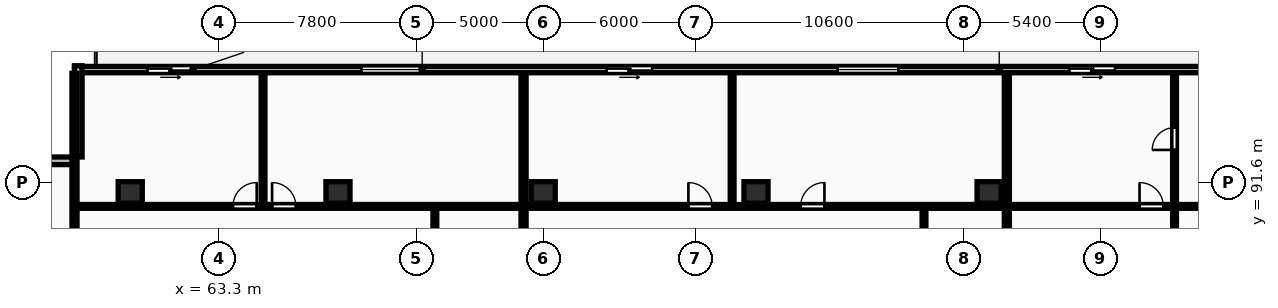
"""IFC4 building model, lengths in metres.
Left out: names, types, materials, properties, quantities, classifications, styles, units other than length and angle.
Written with IfcOpenShell. Run it as: python <this file> out.ifc"""

import sys

from ifc_helpers import new_model, si_unit, direction, frame, frame_2d, origin, origin_2d, place, context, subcontext, project, spatial, rectangle, extrude, element, fill, save


model = new_model("IFC4")
c1 = context("Model", 3, precision=1e-05, world=origin(), true_north=direction((0.0, 1.0)))
c2 = subcontext(c1, "Body", "Model", "MODEL_VIEW")
j1 = project(units=[si_unit("LENGTHUNIT", "METRE"), si_unit("PLANEANGLEUNIT", "RADIAN")], contexts=[c1])
p1 = place(None, origin())
s1 = spatial("IfcSite", under=j1, at=p1, CompositionType="ELEMENT")
p2 = place(p1, origin())
s2 = spatial("IfcBuilding", under=s1, at=p2, CompositionType="ELEMENT")
p3 = place(p2, frame((0.0, 0.0, 106.8)))
s3 = spatial("IfcBuildingStorey", under=s2, at=p3, CompositionType="ELEMENT", Elevation=106.8)
for number, where, z_axis, x_axis in (
    (1, (59.8, 91.2, 0.0), (0.0, 0.0, 1.0), (1.0, 0.0, 0.0)),
    (2, (68.0, 91.2, 0.0), (0.0, 0.0, 1.0), (1.0, 0.0, 0.0)),
    (3, (76.1, 91.2, 0.0), (0.0, 0.0, 1.0), (1.0, 0.0, 0.0)),
    (4, (84.5, 91.2, 0.0), (0.0, 0.0, 1.0), (1.0, 0.0, 0.0)),
    (5, (93.7, 91.2, 0.0), (0.0, 0.0, 1.0), (1.0, 0.0, 0.0)),
):
    element("IfcColumn", number, at=place(p3, frame(where, z_axis=z_axis, x_axis=x_axis)), inside=s3, PredefinedType="COLUMN", context=c2, shape_type="SweptSolid", body=[
        extrude(rectangle(XDim=0.95, YDim=0.85, at=origin_2d()), origin(), (0.0, 0.0, 1.0), 3.25),
    ])
p4 = place(p3, frame((130.6, 96.05, 0.0), z_axis=(0.0, 0.0, 1.0), x_axis=(-1.0, 0.0, 0.0)))
e6 = element("IfcWall", 6, at=p4, inside=s3, PredefinedType="STANDARD", context=c2, shape_type="SweptSolid", body=[
    extrude(rectangle(XDim=73.0, YDim=0.25, at=frame_2d((36.5, 0.0))), origin(), (0.0, 0.0, 1.0), 2.97),
])
p5 = place(p4, frame((68.319, 0.0, 0.0)))
e7 = element("IfcOpeningElement", 7, at=p5, cuts=e6, PredefinedType="OPENING", context=c2, shape_type="SweptSolid", body=[
    extrude(rectangle(XDim=1.8, YDim=2.2, at=frame_2d((0.9, 1.1))), frame((0.0, 0.135, 0.0), z_axis=(0.0, -1.0, 0.0), x_axis=(1.0, 0.0, 0.0)), (0.0, 0.0, 1.0), 0.27),
])
p6 = place(p4, frame((59.277, 0.0, 0.85)))
e8 = element("IfcOpeningElement", 8, at=p6, cuts=e6, PredefinedType="OPENING", context=c2, shape_type="SweptSolid", body=[
    extrude(rectangle(XDim=2.4, YDim=1.9, at=frame_2d((1.2, 0.95))), frame((0.0, 0.135, 0.0), z_axis=(0.0, -1.0, 0.0), x_axis=(1.0, 0.0, 0.0)), (0.0, 0.0, 1.0), 0.27),
])
p7 = place(p4, frame((50.199, 0.0, 0.0)))
e9 = element("IfcOpeningElement", 9, at=p7, cuts=e6, PredefinedType="OPENING", context=c2, shape_type="SweptSolid", body=[
    extrude(rectangle(XDim=1.8, YDim=2.2, at=frame_2d((0.9, 1.1))), frame((0.0, 0.135, 0.0), z_axis=(0.0, -1.0, 0.0), x_axis=(1.0, 0.0, 0.0)), (0.0, 0.0, 1.0), 0.27),
])
p8 = place(p4, frame((40.481, 0.0, 0.85)))
e10 = element("IfcOpeningElement", 10, at=p8, cuts=e6, PredefinedType="OPENING", context=c2, shape_type="SweptSolid", body=[
    extrude(rectangle(XDim=2.4, YDim=1.9, at=frame_2d((1.2, 0.95))), frame((0.0, 0.135, 0.0), z_axis=(0.0, -1.0, 0.0), x_axis=(1.0, 0.0, 0.0)), (0.0, 0.0, 1.0), 0.27),
])
p9 = place(p4, frame((31.93, 0.0, 0.0)))
e11 = element("IfcOpeningElement", 11, at=p9, cuts=e6, PredefinedType="OPENING", context=c2, shape_type="SweptSolid", body=[
    extrude(rectangle(XDim=1.8, YDim=2.2, at=frame_2d((0.9, 1.1))), frame((0.0, 0.135, 0.0), z_axis=(0.0, -1.0, 0.0), x_axis=(1.0, 0.0, 0.0)), (0.0, 0.0, 1.0), 0.27),
])
p10 = place(p4, frame((26.042, 0.0, 0.85)))
e12 = element("IfcOpeningElement", 12, at=p10, cuts=e6, PredefinedType="OPENING", context=c2, shape_type="SweptSolid", body=[
    extrude(rectangle(XDim=2.4, YDim=1.9, at=frame_2d((1.2, 0.95))), frame((0.0, 0.135, 0.0), z_axis=(0.0, -1.0, 0.0), x_axis=(1.0, 0.0, 0.0)), (0.0, 0.0, 1.0), 0.27),
])
p11 = place(p4, frame((19.15, 0.0, 0.0)))
e13 = element("IfcOpeningElement", 13, at=p11, cuts=e6, PredefinedType="OPENING", context=c2, shape_type="SweptSolid", body=[
    extrude(rectangle(XDim=1.8, YDim=2.2, at=frame_2d((0.9, 1.1))), frame((0.0, 0.135, 0.0), z_axis=(0.0, -1.0, 0.0), x_axis=(1.0, 0.0, 0.0)), (0.0, 0.0, 1.0), 0.27),
])
p12 = place(p4, frame((12.886, 0.0, 0.85)))
e14 = element("IfcOpeningElement", 14, at=p12, cuts=e6, PredefinedType="OPENING", context=c2, shape_type="SweptSolid", body=[
    extrude(rectangle(XDim=1.8, YDim=1.8, at=frame_2d((0.9, 0.9))), frame((0.0, 0.135, 0.0), z_axis=(0.0, -1.0, 0.0), x_axis=(1.0, 0.0, 0.0)), (0.0, 0.0, 1.0), 0.27),
])
p13 = place(p4, frame((7.088, 0.0, 0.0)))
e15 = element("IfcOpeningElement", 15, at=p13, cuts=e6, PredefinedType="OPENING", context=c2, shape_type="SweptSolid", body=[
    extrude(rectangle(XDim=1.8, YDim=2.2, at=frame_2d((0.9, 1.1))), frame((0.0, 0.135, 0.0), z_axis=(0.0, -1.0, 0.0), x_axis=(1.0, 0.0, 0.0)), (0.0, 0.0, 1.0), 0.27),
])
p14 = place(p4, frame((0.9, 0.0, 0.85)))
e16 = element("IfcOpeningElement", 16, at=p14, cuts=e6, PredefinedType="OPENING", context=c2, shape_type="SweptSolid", body=[
    extrude(rectangle(XDim=2.4, YDim=1.9, at=frame_2d((1.2, 0.95))), frame((0.0, 0.135, 0.0), z_axis=(0.0, -1.0, 0.0), x_axis=(1.0, 0.0, 0.0)), (0.0, 0.0, 1.0), 0.27),
])
p15 = place(p3, frame((57.75, 96.2, 0.0), z_axis=(0.0, 0.0, 1.0), x_axis=(0.0, -1.0, 0.0)))
e17 = element("IfcWall", 17, at=p15, inside=s3, PredefinedType="STANDARD", context=c2, shape_type="SweptSolid", body=[
    extrude(rectangle(XDim=3.6, YDim=0.3, at=frame_2d((1.8, 0.0))), origin(), (0.0, 0.0, 1.0), 2.97),
])
p16 = place(p3, frame((57.6, 92.45, 0.0), z_axis=(0.0, 0.0, 1.0), x_axis=(-1.0, 0.0, 0.0)))
e18 = element("IfcWall", 18, at=p16, inside=s3, PredefinedType="STANDARD", context=c2, shape_type="SweptSolid", body=[
    extrude(rectangle(XDim=3.6, YDim=0.3, at=frame_2d((1.8, 0.0))), origin(), (0.0, 0.0, 1.0), 2.97),
])
for number, where, z_axis, x_axis in (
    (19, (57.6, 69.83, 0.0), (0.0, 0.0, 1.0), (0.0, 1.0, 0.0)),
    (20, (75.325, 69.83, 0.0), (0.0, 0.0, 1.0), (0.0, 1.0, 0.0)),
):
    element("IfcWall", number, at=place(p3, frame(where, z_axis=z_axis, x_axis=x_axis)), inside=s3, PredefinedType="PARTITIONING", context=c2, shape_type="SweptSolid", body=[
        extrude(rectangle(XDim=26.07, YDim=0.2, at=frame_2d((13.035, 0.0))), origin(), (0.0, 0.0, 1.0), 2.97),
    ])
p17 = place(p3, frame((71.825, 69.81, 0.0), z_axis=(0.0, 0.0, 1.0), x_axis=(0.0, 1.0, 0.0)))
e21 = element("IfcWall", 21, at=p17, inside=s3, PredefinedType="PARTITIONING", context=c2, shape_type="SweptSolid", body=[
    extrude(rectangle(XDim=20.78, YDim=0.15, at=frame_2d((10.39, 0.0))), origin(), (0.0, 0.0, 1.0), 2.97),
])
p18 = place(p17, frame((2.406, 0.0, 0.0)))
e22 = element("IfcOpeningElement", 22, at=p18, cuts=e21, PredefinedType="OPENING", context=c2, shape_type="SweptSolid", body=[
    extrude(rectangle(XDim=0.96, YDim=2.1, at=frame_2d((0.48, 1.05))), frame((0.0, 0.085, 0.0), z_axis=(0.0, -1.0, 0.0), x_axis=(1.0, 0.0, 0.0)), (0.0, 0.0, 1.0), 0.17),
])
p19 = place(p17, frame((6.133, 0.0, 0.0)))
e23 = element("IfcOpeningElement", 23, at=p19, cuts=e21, PredefinedType="OPENING", context=c2, shape_type="SweptSolid", body=[
    extrude(rectangle(XDim=0.88, YDim=2.06, at=frame_2d((0.44, 1.03))), frame((0.0, 0.085, 0.0), z_axis=(0.0, -1.0, 0.0), x_axis=(1.0, 0.0, 0.0)), (0.0, 0.0, 1.0), 0.17),
])
p20 = place(p17, frame((9.97, 0.0, 0.0)))
e24 = element("IfcOpeningElement", 24, at=p20, cuts=e21, PredefinedType="OPENING", context=c2, shape_type="SweptSolid", body=[
    extrude(rectangle(XDim=0.84, YDim=2.04, at=frame_2d((0.42, 1.02))), frame((0.0, 0.085, 0.0), z_axis=(0.0, -1.0, 0.0), x_axis=(1.0, 0.0, 0.0)), (0.0, 0.0, 1.0), 0.17),
])
p21 = place(p3, frame((65.042, 90.73, 0.0), z_axis=(0.0, 0.0, 1.0), x_axis=(0.0, 1.0, 0.0)))
e25 = element("IfcWall", 25, at=p21, inside=s3, PredefinedType="PARTITIONING", context=c2, shape_type="SweptSolid", body=[
    extrude(rectangle(XDim=5.17, YDim=0.15, at=frame_2d((2.585, 0.0))), origin(), (0.0, 0.0, 1.0), 2.97),
])
p22 = place(p3, frame((57.68, 90.65, 0.0), z_axis=(0.0, 0.0, 1.0), x_axis=(1.0, 0.0, 0.0)))
e26 = element("IfcWall", 26, at=p22, inside=s3, PredefinedType="PARTITIONING", context=c2, shape_type="SweptSolid", body=[
    extrude(rectangle(XDim=17.565, YDim=0.15, at=frame_2d((8.782, 0.0))), origin(), (0.0, 0.0, 1.0), 2.97),
])
p23 = place(p22, frame((6.172, 0.0, 0.0)))
e27 = element("IfcOpeningElement", 27, at=p23, cuts=e26, PredefinedType="OPENING", context=c2, shape_type="SweptSolid", body=[
    extrude(rectangle(XDim=0.94, YDim=2.1, at=frame_2d((0.47, 1.05))), frame((0.0, 0.085, 0.0), z_axis=(0.0, -1.0, 0.0), x_axis=(1.0, 0.0, 0.0)), (0.0, 0.0, 1.0), 0.17),
])
p24 = place(p22, frame((7.719, 0.0, 0.0)))
e28 = element("IfcOpeningElement", 28, at=p24, cuts=e26, PredefinedType="OPENING", context=c2, shape_type="SweptSolid", body=[
    extrude(rectangle(XDim=0.94, YDim=2.1, at=frame_2d((0.47, 1.05))), frame((0.0, 0.085, 0.0), z_axis=(0.0, -1.0, 0.0), x_axis=(1.0, 0.0, 0.0)), (0.0, 0.0, 1.0), 0.17),
])
p25 = place(p3, frame((94.401, 69.83, 0.0), z_axis=(0.0, 0.0, 1.0), x_axis=(0.0, 1.0, 0.0)))
e29 = element("IfcWall", 29, at=p25, inside=s3, PredefinedType="PARTITIONING", context=c2, shape_type="SweptSolid", body=[
    extrude(rectangle(XDim=26.07, YDim=0.2, at=frame_2d((13.035, 0.0))), origin(), (0.0, 0.0, 1.0), 2.97),
])
p26 = place(p3, frame((91.131, 69.81, 0.0), z_axis=(0.0, 0.0, 1.0), x_axis=(0.0, 1.0, 0.0)))
e30 = element("IfcWall", 30, at=p26, inside=s3, PredefinedType="PARTITIONING", context=c2, shape_type="SweptSolid", body=[
    extrude(rectangle(XDim=20.78, YDim=0.15, at=frame_2d((10.39, 0.0))), origin(), (0.0, 0.0, 1.0), 2.97),
])
p27 = place(p26, frame((2.406, 0.0, 0.0)))
e31 = element("IfcOpeningElement", 31, at=p27, cuts=e30, PredefinedType="OPENING", context=c2, shape_type="SweptSolid", body=[
    extrude(rectangle(XDim=0.96, YDim=2.1, at=frame_2d((0.48, 1.05))), frame((0.0, 0.085, 0.0), z_axis=(0.0, -1.0, 0.0), x_axis=(1.0, 0.0, 0.0)), (0.0, 0.0, 1.0), 0.17),
])
p28 = place(p26, frame((6.133, 0.0, 0.0)))
e32 = element("IfcOpeningElement", 32, at=p28, cuts=e30, PredefinedType="OPENING", context=c2, shape_type="SweptSolid", body=[
    extrude(rectangle(XDim=0.88, YDim=2.06, at=frame_2d((0.44, 1.03))), frame((0.0, 0.085, 0.0), z_axis=(0.0, -1.0, 0.0), x_axis=(1.0, 0.0, 0.0)), (0.0, 0.0, 1.0), 0.17),
])
p29 = place(p26, frame((11.615, 0.0, 0.0)))
e33 = element("IfcOpeningElement", 33, at=p29, cuts=e30, PredefinedType="OPENING", context=c2, shape_type="SweptSolid", body=[
    extrude(rectangle(XDim=0.84, YDim=2.04, at=frame_2d((0.42, 1.02))), frame((0.0, 0.085, 0.0), z_axis=(0.0, -1.0, 0.0), x_axis=(1.0, 0.0, 0.0)), (0.0, 0.0, 1.0), 0.17),
])
p30 = place(p3, frame((83.558, 90.73, 0.0), z_axis=(0.0, 0.0, 1.0), x_axis=(0.0, 1.0, 0.0)))
e34 = element("IfcWall", 34, at=p30, inside=s3, PredefinedType="PARTITIONING", context=c2, shape_type="SweptSolid", body=[
    extrude(rectangle(XDim=5.17, YDim=0.15, at=frame_2d((2.585, 0.0))), origin(), (0.0, 0.0, 1.0), 2.97),
])
p31 = place(p3, frame((75.405, 90.65, 0.0), z_axis=(0.0, 0.0, 1.0), x_axis=(1.0, 0.0, 0.0)))
e35 = element("IfcWall", 35, at=p31, inside=s3, PredefinedType="PARTITIONING", context=c2, shape_type="SweptSolid", body=[
    extrude(rectangle(XDim=18.916, YDim=0.15, at=frame_2d((9.458, 0.0))), origin(), (0.0, 0.0, 1.0), 2.97),
])
p32 = place(p31, frame((6.426, 0.0, 0.0)))
e36 = element("IfcOpeningElement", 36, at=p32, cuts=e35, PredefinedType="OPENING", context=c2, shape_type="SweptSolid", body=[
    extrude(rectangle(XDim=0.94, YDim=2.1, at=frame_2d((0.47, 1.05))), frame((0.0, 0.085, 0.0), z_axis=(0.0, -1.0, 0.0), x_axis=(1.0, 0.0, 0.0)), (0.0, 0.0, 1.0), 0.17),
])
p33 = place(p31, frame((10.856, 0.0, 0.0)))
e37 = element("IfcOpeningElement", 37, at=p33, cuts=e35, PredefinedType="OPENING", context=c2, shape_type="SweptSolid", body=[
    extrude(rectangle(XDim=0.94, YDim=2.1, at=frame_2d((0.47, 1.05))), frame((0.0, 0.085, 0.0), z_axis=(0.0, -1.0, 0.0), x_axis=(1.0, 0.0, 0.0)), (0.0, 0.0, 1.0), 0.17),
])
p34 = place(p3, frame((101.02, 85.59, 0.0), z_axis=(0.0, 0.0, 1.0), x_axis=(0.0, 1.0, 0.0)))
e38 = element("IfcWall", 38, at=p34, inside=s3, PredefinedType="PARTITIONING", context=c2, shape_type="SweptSolid", body=[
    extrude(rectangle(XDim=10.31, YDim=0.15, at=frame_2d((5.155, 0.0))), origin(), (0.0, 0.0, 1.0), 2.97),
])
p35 = place(p34, frame((1.43, 0.0, 0.0)))
e39 = element("IfcOpeningElement", 39, at=p35, cuts=e38, PredefinedType="OPENING", context=c2, shape_type="SweptSolid", body=[
    extrude(rectangle(XDim=0.84, YDim=2.04, at=frame_2d((0.42, 1.02))), frame((0.0, 0.085, 0.0), z_axis=(0.0, -1.0, 0.0), x_axis=(1.0, 0.0, 0.0)), (0.0, 0.0, 1.0), 0.17),
])
p36 = place(p34, frame((3.102, 0.0, 0.0)))
e40 = element("IfcOpeningElement", 40, at=p36, cuts=e38, PredefinedType="OPENING", context=c2, shape_type="SweptSolid", body=[
    extrude(rectangle(XDim=0.84, YDim=2.04, at=frame_2d((0.42, 1.02))), frame((0.0, 0.085, 0.0), z_axis=(0.0, -1.0, 0.0), x_axis=(1.0, 0.0, 0.0)), (0.0, 0.0, 1.0), 0.17),
])
p37 = place(p34, frame((7.29, 0.0, 0.0)))
e41 = element("IfcOpeningElement", 41, at=p37, cuts=e38, PredefinedType="OPENING", context=c2, shape_type="SweptSolid", body=[
    extrude(rectangle(XDim=0.88, YDim=2.06, at=frame_2d((0.44, 1.03))), frame((0.0, 0.085, 0.0), z_axis=(0.0, -1.0, 0.0), x_axis=(1.0, 0.0, 0.0)), (0.0, 0.0, 1.0), 0.17),
])
p38 = place(p3, frame((94.481, 90.65, 0.0), z_axis=(0.0, 0.0, 1.0), x_axis=(1.0, 0.0, 0.0)))
e42 = element("IfcWall", 42, at=p38, inside=s3, PredefinedType="PARTITIONING", context=c2, shape_type="SweptSolid", body=[
    extrude(rectangle(XDim=11.256, YDim=0.15, at=frame_2d((5.628, 0.0))), origin(), (0.0, 0.0, 1.0), 2.97),
])
p39 = place(p38, frame((5.158, 0.0, 0.0)))
e43 = element("IfcOpeningElement", 43, at=p39, cuts=e42, PredefinedType="OPENING", context=c2, shape_type="SweptSolid", body=[
    extrude(rectangle(XDim=0.94, YDim=2.1, at=frame_2d((0.47, 1.05))), frame((0.0, 0.085, 0.0), z_axis=(0.0, -1.0, 0.0), x_axis=(1.0, 0.0, 0.0)), (0.0, 0.0, 1.0), 0.17),
])
p40 = place(p5, origin())
e44 = element("IfcDoor", 44, at=p40, inside=s3, OperationType="SLIDING_TO_LEFT", PredefinedType="DOOR", context=c2, shape_type="SweptSolid", body=[
    extrude(rectangle(XDim=1.8, YDim=2.2, at=frame_2d((0.9, 1.1))), frame((0.0, 0.025, 0.0), z_axis=(0.0, -1.0, 0.0), x_axis=(1.0, 0.0, 0.0)), (0.0, 0.0, 1.0), 0.05),
])
fill(e7, e44)
p41 = place(p6, origin())
e45 = element("IfcWindow", 45, at=p41, inside=s3, PartitioningType="DOUBLE_PANEL_VERTICAL", PredefinedType="WINDOW", context=c2, shape_type="SweptSolid", body=[
    extrude(rectangle(XDim=2.4, YDim=1.9, at=frame_2d((1.2, 0.95))), frame((0.0, 0.03, 0.0), z_axis=(0.0, -1.0, 0.0), x_axis=(1.0, 0.0, 0.0)), (0.0, 0.0, 1.0), 0.06),
])
fill(e8, e45)
p42 = place(p7, origin())
e46 = element("IfcDoor", 46, at=p42, inside=s3, OperationType="SLIDING_TO_LEFT", PredefinedType="DOOR", context=c2, shape_type="SweptSolid", body=[
    extrude(rectangle(XDim=1.8, YDim=2.2, at=frame_2d((0.9, 1.1))), frame((0.0, 0.025, 0.0), z_axis=(0.0, -1.0, 0.0), x_axis=(1.0, 0.0, 0.0)), (0.0, 0.0, 1.0), 0.05),
])
fill(e9, e46)
p43 = place(p8, origin())
e47 = element("IfcWindow", 47, at=p43, inside=s3, PartitioningType="DOUBLE_PANEL_VERTICAL", PredefinedType="WINDOW", context=c2, shape_type="SweptSolid", body=[
    extrude(rectangle(XDim=2.4, YDim=1.9, at=frame_2d((1.2, 0.95))), frame((0.0, 0.03, 0.0), z_axis=(0.0, -1.0, 0.0), x_axis=(1.0, 0.0, 0.0)), (0.0, 0.0, 1.0), 0.06),
])
fill(e10, e47)
p44 = place(p9, origin())
e48 = element("IfcDoor", 48, at=p44, inside=s3, OperationType="SLIDING_TO_LEFT", PredefinedType="DOOR", context=c2, shape_type="SweptSolid", body=[
    extrude(rectangle(XDim=1.8, YDim=2.2, at=frame_2d((0.9, 1.1))), frame((0.0, 0.025, 0.0), z_axis=(0.0, -1.0, 0.0), x_axis=(1.0, 0.0, 0.0)), (0.0, 0.0, 1.0), 0.05),
])
fill(e11, e48)
p45 = place(p23, origin())
e49 = element("IfcDoor", 49, at=p45, inside=s3, OperationType="SINGLE_SWING_RIGHT", PredefinedType="DOOR", context=c2, shape_type="SweptSolid", body=[
    extrude(rectangle(XDim=0.94, YDim=2.1, at=frame_2d((0.47, 1.05))), frame((0.0, 0.025, 0.0), z_axis=(0.0, -1.0, 0.0), x_axis=(1.0, 0.0, 0.0)), (0.0, 0.0, 1.0), 0.05),
])
fill(e27, e49)
p46 = place(p24, origin())
e50 = element("IfcDoor", 50, at=p46, inside=s3, OperationType="SINGLE_SWING_LEFT", PredefinedType="DOOR", context=c2, shape_type="SweptSolid", body=[
    extrude(rectangle(XDim=0.94, YDim=2.1, at=frame_2d((0.47, 1.05))), frame((0.0, 0.025, 0.0), z_axis=(0.0, -1.0, 0.0), x_axis=(1.0, 0.0, 0.0)), (0.0, 0.0, 1.0), 0.05),
])
fill(e28, e50)
p47 = place(p32, origin())
e51 = element("IfcDoor", 51, at=p47, inside=s3, OperationType="SINGLE_SWING_LEFT", PredefinedType="DOOR", context=c2, shape_type="SweptSolid", body=[
    extrude(rectangle(XDim=0.94, YDim=2.1, at=frame_2d((0.47, 1.05))), frame((0.0, 0.025, 0.0), z_axis=(0.0, -1.0, 0.0), x_axis=(1.0, 0.0, 0.0)), (0.0, 0.0, 1.0), 0.05),
])
fill(e36, e51)
p48 = place(p33, origin())
e52 = element("IfcDoor", 52, at=p48, inside=s3, OperationType="SINGLE_SWING_RIGHT", PredefinedType="DOOR", context=c2, shape_type="SweptSolid", body=[
    extrude(rectangle(XDim=0.94, YDim=2.1, at=frame_2d((0.47, 1.05))), frame((0.0, 0.025, 0.0), z_axis=(0.0, -1.0, 0.0), x_axis=(1.0, 0.0, 0.0)), (0.0, 0.0, 1.0), 0.05),
])
fill(e37, e52)
p49 = place(p37, origin())
e53 = element("IfcDoor", 53, at=p49, inside=s3, OperationType="SINGLE_SWING_LEFT", PredefinedType="DOOR", context=c2, shape_type="SweptSolid", body=[
    extrude(rectangle(XDim=0.88, YDim=2.06, at=frame_2d((0.44, 1.03))), frame((0.0, 0.025, 0.0), z_axis=(0.0, -1.0, 0.0), x_axis=(1.0, 0.0, 0.0)), (0.0, 0.0, 1.0), 0.05),
])
fill(e41, e53)
p50 = place(p39, origin())
e54 = element("IfcDoor", 54, at=p50, inside=s3, OperationType="SINGLE_SWING_LEFT", PredefinedType="DOOR", context=c2, shape_type="SweptSolid", body=[
    extrude(rectangle(XDim=0.94, YDim=2.1, at=frame_2d((0.47, 1.05))), frame((0.0, 0.025, 0.0), z_axis=(0.0, -1.0, 0.0), x_axis=(1.0, 0.0, 0.0)), (0.0, 0.0, 1.0), 0.05),
])
fill(e43, e54)
save(model, sys.argv[1])
